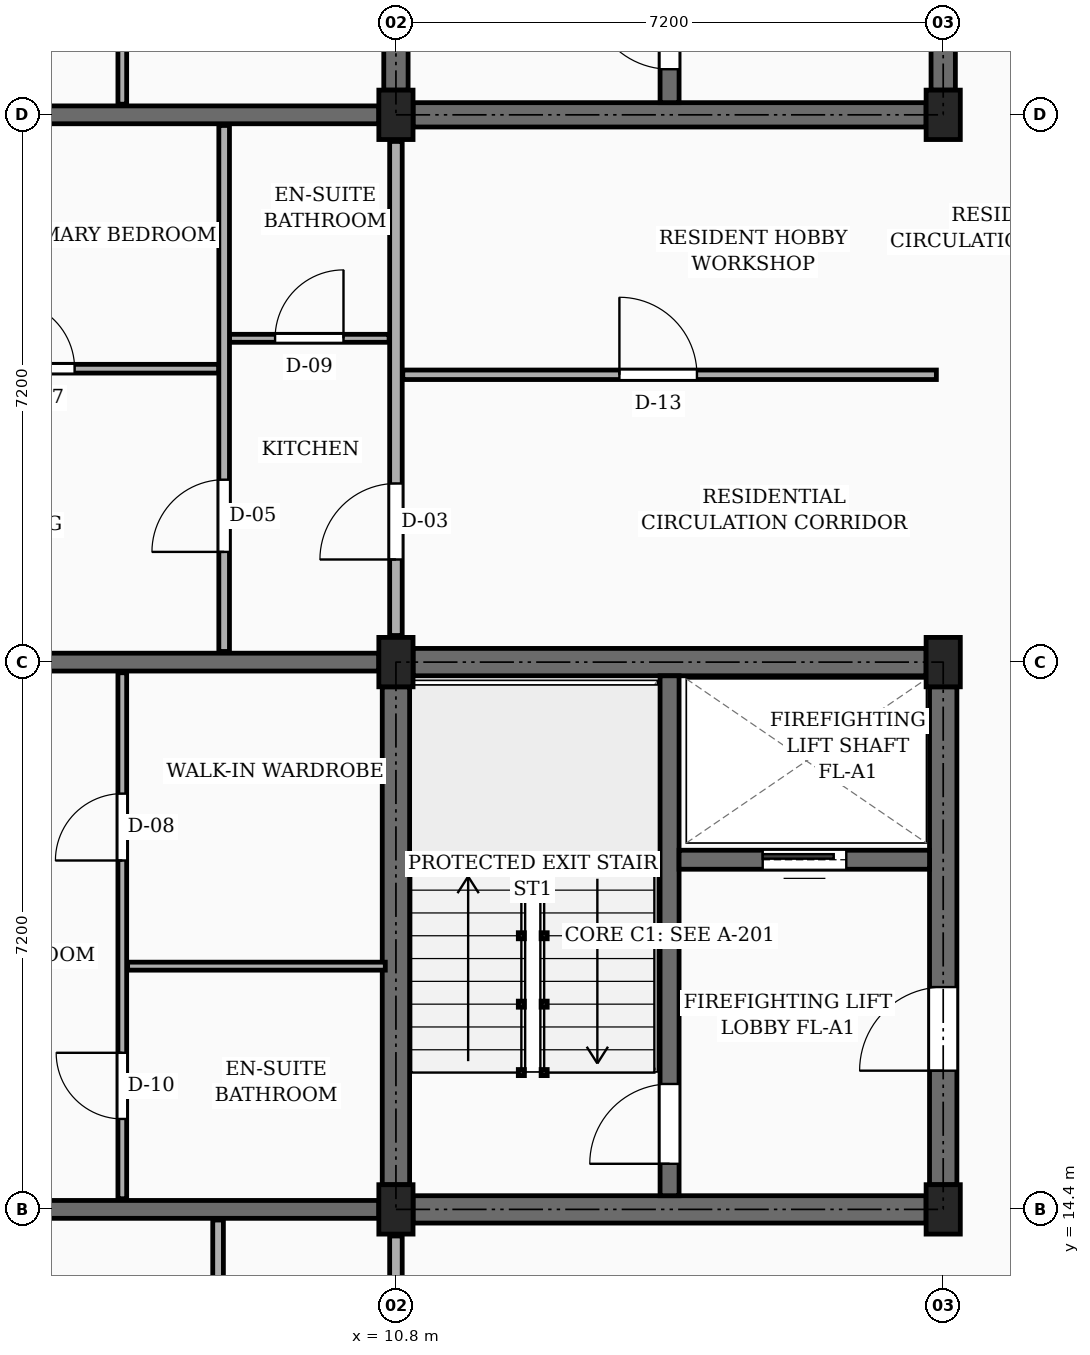
"""IFC4 building model, lengths in metres.
Left out: names, types, materials, properties, quantities, classifications, styles, units other than length and angle.
Written with IfcOpenShell. Run it as: python <this file> out.ifc"""

import sys

from ifc_helpers import new_model, si_unit, direction, frame, frame_2d, origin, origin_2d, place, context, subcontext, project, spatial, rectangle, extrude, element, fill, save


model = new_model("IFC4")
c1 = context("Model", 3, precision=1e-05, world=origin(), true_north=direction((0.0, 1.0)))
c2 = subcontext(c1, "Body", "Model", "MODEL_VIEW")
j1 = project(units=[si_unit("LENGTHUNIT", "METRE"), si_unit("PLANEANGLEUNIT", "RADIAN")], contexts=[c1])
p1 = place(None, origin())
s1 = spatial("IfcSite", under=j1, at=p1, CompositionType="ELEMENT")
p2 = place(p1, origin())
s2 = spatial("IfcBuilding", under=s1, at=p2, CompositionType="ELEMENT")
p3 = place(p2, frame((0.0, 0.0, 13.95)))
s3 = spatial("IfcBuildingStorey", under=s2, at=p3, CompositionType="ELEMENT", Elevation=13.95)
for number, where, z_axis, x_axis in (
    (1, (10.8, 14.4, 0.0), (0.0, 0.0, 1.0), (1.0, 0.0, 0.0)),
    (2, (10.8, 21.6, 0.0), (0.0, 0.0, 1.0), (1.0, 0.0, 0.0)),
    (3, (10.8, 28.8, 0.0), (0.0, 0.0, 1.0), (1.0, 0.0, 0.0)),
    (4, (18.0, 14.4, 0.0), (0.0, 0.0, 1.0), (1.0, 0.0, 0.0)),
    (5, (18.0, 21.6, 0.0), (0.0, 0.0, 1.0), (1.0, 0.0, 0.0)),
    (6, (18.0, 28.8, 0.0), (0.0, 0.0, 1.0), (1.0, 0.0, 0.0)),
):
    element("IfcColumn", number, at=place(p3, frame(where, z_axis=z_axis, x_axis=x_axis)), inside=s3, PredefinedType="COLUMN", context=c2, shape_type="SweptSolid", body=[
        extrude(rectangle(XDim=0.45, YDim=0.65, at=origin_2d()), origin(), (0.0, 0.0, 1.0), 3.15),
    ])
p4 = place(p3, frame((3.875, 14.4, 0.0), z_axis=(0.0, 0.0, 1.0), x_axis=(1.0, 0.0, 0.0)))
e7 = element("IfcWall", 7, at=p4, inside=s3, PredefinedType="SOLIDWALL", context=c2, shape_type="SweptSolid", body=[
    extrude(rectangle(XDim=6.7, YDim=0.235, at=frame_2d((3.35, 0.0))), origin(), (0.0, 0.0, 1.0), 2.17),
])
p5 = place(p4, frame((1.35, 0.0, 0.0)))
e8 = element("IfcOpeningElement", 8, at=p5, cuts=e7, PredefinedType="OPENING", context=c2, shape_type="SweptSolid", body=[
    extrude(rectangle(XDim=0.98, YDim=2.12, at=frame_2d((0.49, 1.06))), frame((0.0, 0.127, 0.0), z_axis=(0.0, -1.0, 0.0), x_axis=(1.0, 0.0, 0.0)), (0.0, 0.0, 1.0), 0.255),
])
p6 = place(p3, frame((3.875, 21.6, 0.0), z_axis=(0.0, 0.0, 1.0), x_axis=(1.0, 0.0, 0.0)))
e9 = element("IfcWall", 9, at=p6, inside=s3, PredefinedType="SOLIDWALL", context=c2, shape_type="SweptSolid", body=[
    extrude(rectangle(XDim=6.7, YDim=0.235, at=frame_2d((3.35, 0.0))), origin(), (0.0, 0.0, 1.0), 2.17),
])
p7 = place(p3, frame((3.875, 28.8, 0.0), z_axis=(0.0, 0.0, 1.0), x_axis=(1.0, 0.0, 0.0)))
e10 = element("IfcWall", 10, at=p7, inside=s3, PredefinedType="SOLIDWALL", context=c2, shape_type="SweptSolid", body=[
    extrude(rectangle(XDim=6.7, YDim=0.235, at=frame_2d((3.35, 0.0))), origin(), (0.0, 0.0, 1.0), 2.17),
])
p8 = place(p7, frame((1.35, 0.0, 0.0)))
e11 = element("IfcOpeningElement", 11, at=p8, cuts=e10, PredefinedType="OPENING", context=c2, shape_type="SweptSolid", body=[
    extrude(rectangle(XDim=0.98, YDim=2.12, at=frame_2d((0.49, 1.06))), frame((0.0, 0.127, 0.0), z_axis=(0.0, -1.0, 0.0), x_axis=(1.0, 0.0, 0.0)), (0.0, 0.0, 1.0), 0.255),
])
p9 = place(p3, frame((10.8, 14.725, 0.0), z_axis=(0.0, 0.0, 1.0), x_axis=(0.0, 1.0, 0.0)))
e12 = element("IfcWall", 12, at=p9, inside=s3, PredefinedType="SHEAR", context=c2, shape_type="SweptSolid", body=[
    extrude(rectangle(XDim=6.55, YDim=0.36, at=frame_2d((3.275, 0.0))), origin(), (0.0, 0.0, 1.0), 2.87),
])
p10 = place(p3, frame((11.025, 21.6, 0.0), z_axis=(0.0, 0.0, 1.0), x_axis=(1.0, 0.0, 0.0)))
e13 = element("IfcWall", 13, at=p10, inside=s3, PredefinedType="SHEAR", context=c2, shape_type="SweptSolid", body=[
    extrude(rectangle(XDim=6.75, YDim=0.36, at=frame_2d((3.375, 0.0))), origin(), (0.0, 0.0, 1.0), 2.87),
])
p11 = place(p3, frame((18.0, 14.725, 0.0), z_axis=(0.0, 0.0, 1.0), x_axis=(0.0, 1.0, 0.0)))
e14 = element("IfcWall", 14, at=p11, inside=s3, PredefinedType="SHEAR", context=c2, shape_type="SweptSolid", body=[
    extrude(rectangle(XDim=6.55, YDim=0.36, at=frame_2d((3.275, 0.0))), origin(), (0.0, 0.0, 1.0), 2.87),
])
p12 = place(p11, frame((1.5, 0.0, 0.0)))
e15 = element("IfcOpeningElement", 15, at=p12, cuts=e14, PredefinedType="OPENING", context=c2, shape_type="SweptSolid", body=[
    extrude(rectangle(XDim=1.1, YDim=2.15, at=frame_2d((0.55, 1.075))), frame((0.0, 0.19, 0.0), z_axis=(0.0, -1.0, 0.0), x_axis=(1.0, 0.0, 0.0)), (0.0, 0.0, 1.0), 0.38),
])
p13 = place(p3, frame((11.025, 14.4, 0.0), z_axis=(0.0, 0.0, 1.0), x_axis=(1.0, 0.0, 0.0)))
e16 = element("IfcWall", 16, at=p13, inside=s3, PredefinedType="SHEAR", context=c2, shape_type="SweptSolid", body=[
    extrude(rectangle(XDim=6.75, YDim=0.36, at=frame_2d((3.375, 0.0))), origin(), (0.0, 0.0, 1.0), 2.87),
])
p14 = place(p3, frame((14.4, 14.58, 0.0), z_axis=(0.0, 0.0, 1.0), x_axis=(0.0, 1.0, 0.0)))
e17 = element("IfcWall", 17, at=p14, inside=s3, PredefinedType="SHEAR", context=c2, shape_type="SweptSolid", body=[
    extrude(rectangle(XDim=6.84, YDim=0.25, at=frame_2d((3.42, 0.0))), origin(), (0.0, 0.0, 1.0), 2.87),
])
p15 = place(p14, frame((0.42, 0.0, 0.0)))
e18 = element("IfcOpeningElement", 18, at=p15, cuts=e17, PredefinedType="OPENING", context=c2, shape_type="SweptSolid", body=[
    extrude(rectangle(XDim=1.05, YDim=2.15, at=frame_2d((0.525, 1.075))), frame((0.0, 0.135, 0.0), z_axis=(0.0, -1.0, 0.0), x_axis=(1.0, 0.0, 0.0)), (0.0, 0.0, 1.0), 0.27),
])
p16 = place(p3, frame((14.525, 19.0, 0.0), z_axis=(0.0, 0.0, 1.0), x_axis=(1.0, 0.0, 0.0)))
e19 = element("IfcWall", 19, at=p16, inside=s3, PredefinedType="SHEAR", context=c2, shape_type="SweptSolid", body=[
    extrude(rectangle(XDim=3.295, YDim=0.25, at=frame_2d((1.647, 0.0))), origin(), (0.0, 0.0, 1.0), 2.87),
])
p17 = place(p16, frame((1.1, 0.0, 0.0)))
e20 = element("IfcOpeningElement", 20, at=p17, cuts=e19, PredefinedType="OPENING", context=c2, shape_type="SweptSolid", body=[
    extrude(rectangle(XDim=1.1, YDim=2.2, at=frame_2d((0.55, 1.1))), frame((0.0, 0.135, 0.0), z_axis=(0.0, -1.0, 0.0), x_axis=(1.0, 0.0, 0.0)), (0.0, 0.0, 1.0), 0.27),
])
p18 = place(p3, frame((10.8, 29.125, 0.0), z_axis=(0.0, 0.0, 1.0), x_axis=(0.0, 1.0, 0.0)))
e21 = element("IfcWall", 21, at=p18, inside=s3, PredefinedType="SHEAR", context=c2, shape_type="SweptSolid", body=[
    extrude(rectangle(XDim=6.55, YDim=0.32, at=frame_2d((3.275, 0.0))), origin(), (0.0, 0.0, 1.0), 2.87),
])
p19 = place(p3, frame((18.0, 29.125, 0.0), z_axis=(0.0, 0.0, 1.0), x_axis=(0.0, 1.0, 0.0)))
e22 = element("IfcWall", 22, at=p19, inside=s3, PredefinedType="SHEAR", context=c2, shape_type="SweptSolid", body=[
    extrude(rectangle(XDim=6.55, YDim=0.32, at=frame_2d((3.275, 0.0))), origin(), (0.0, 0.0, 1.0), 2.87),
])
p20 = place(p19, frame((1.5, 0.0, 0.0)))
e23 = element("IfcOpeningElement", 23, at=p20, cuts=e22, PredefinedType="OPENING", context=c2, shape_type="SweptSolid", body=[
    extrude(rectangle(XDim=1.1, YDim=2.15, at=frame_2d((0.55, 1.075))), frame((0.0, 0.17, 0.0), z_axis=(0.0, -1.0, 0.0), x_axis=(1.0, 0.0, 0.0)), (0.0, 0.0, 1.0), 0.34),
])
p21 = place(p3, frame((11.025, 28.8, 0.0), z_axis=(0.0, 0.0, 1.0), x_axis=(1.0, 0.0, 0.0)))
e24 = element("IfcWall", 24, at=p21, inside=s3, PredefinedType="SHEAR", context=c2, shape_type="SweptSolid", body=[
    extrude(rectangle(XDim=6.75, YDim=0.32, at=frame_2d((3.375, 0.0))), origin(), (0.0, 0.0, 1.0), 2.87),
])
p22 = place(p3, frame((14.4, 28.96, 0.0), z_axis=(0.0, 0.0, 1.0), x_axis=(0.0, 1.0, 0.0)))
e25 = element("IfcWall", 25, at=p22, inside=s3, PredefinedType="SHEAR", context=c2, shape_type="SweptSolid", body=[
    extrude(rectangle(XDim=6.88, YDim=0.25, at=frame_2d((3.44, 0.0))), origin(), (0.0, 0.0, 1.0), 2.87),
])
p23 = place(p22, frame((0.44, 0.0, 0.0)))
e26 = element("IfcOpeningElement", 26, at=p23, cuts=e25, PredefinedType="OPENING", context=c2, shape_type="SweptSolid", body=[
    extrude(rectangle(XDim=1.05, YDim=2.15, at=frame_2d((0.525, 1.075))), frame((0.0, 0.135, 0.0), z_axis=(0.0, -1.0, 0.0), x_axis=(1.0, 0.0, 0.0)), (0.0, 0.0, 1.0), 0.27),
])
p24 = place(p3, frame((10.8, 7.55, 0.0), z_axis=(0.0, 0.0, 1.0), x_axis=(0.0, 1.0, 0.0)))
e27 = element("IfcWall", 27, at=p24, inside=s3, PredefinedType="PARTITIONING", context=c2, shape_type="SweptSolid", body=[
    extrude(rectangle(XDim=6.5, YDim=0.165, at=frame_2d((3.25, 0.0))), origin(), (0.0, 0.0, 1.0), 2.305),
])
p25 = place(p24, frame((1.0, 0.0, 0.0)))
e28 = element("IfcOpeningElement", 28, at=p25, cuts=e27, PredefinedType="OPENING", context=c2, shape_type="SweptSolid", body=[
    extrude(rectangle(XDim=1.14, YDim=2.18, at=frame_2d((0.57, 1.09))), frame((0.0, 0.093, 0.0), z_axis=(0.0, -1.0, 0.0), x_axis=(1.0, 0.0, 0.0)), (0.0, 0.0, 1.0), 0.185),
])
p26 = place(p3, frame((10.8, 21.95, 0.0), z_axis=(0.0, 0.0, 1.0), x_axis=(0.0, 1.0, 0.0)))
e29 = element("IfcWall", 29, at=p26, inside=s3, PredefinedType="PARTITIONING", context=c2, shape_type="SweptSolid", body=[
    extrude(rectangle(XDim=6.5, YDim=0.165, at=frame_2d((3.25, 0.0))), origin(), (0.0, 0.0, 1.0), 2.305),
])
p27 = place(p26, frame((1.0, 0.0, 0.0)))
e30 = element("IfcOpeningElement", 30, at=p27, cuts=e29, PredefinedType="OPENING", context=c2, shape_type="SweptSolid", body=[
    extrude(rectangle(XDim=1.0, YDim=2.15, at=frame_2d((0.5, 1.075))), frame((0.0, 0.093, 0.0), z_axis=(0.0, -1.0, 0.0), x_axis=(1.0, 0.0, 0.0)), (0.0, 0.0, 1.0), 0.185),
])
p28 = place(p3, frame((8.46, 7.375, 0.0), z_axis=(0.0, 0.0, 1.0), x_axis=(0.0, 1.0, 0.0)))
e31 = element("IfcWall", 31, at=p28, inside=s3, PredefinedType="PARTITIONING", context=c2, shape_type="SweptSolid", body=[
    extrude(rectangle(XDim=6.885, YDim=0.14, at=frame_2d((3.442, 0.0))), origin(), (0.0, 0.0, 1.0), 2.305),
])
p29 = place(p28, frame((1.275, 0.0, 0.0)))
e32 = element("IfcOpeningElement", 32, at=p29, cuts=e31, PredefinedType="OPENING", context=c2, shape_type="SweptSolid", body=[
    extrude(rectangle(XDim=0.92, YDim=2.1, at=frame_2d((0.46, 1.05))), frame((0.0, 0.08, 0.0), z_axis=(0.0, -1.0, 0.0), x_axis=(1.0, 0.0, 0.0)), (0.0, 0.0, 1.0), 0.16),
])
p30 = place(p3, frame((7.2, 14.54, 0.0), z_axis=(0.0, 0.0, 1.0), x_axis=(0.0, 1.0, 0.0)))
e33 = element("IfcWall", 33, at=p30, inside=s3, PredefinedType="PARTITIONING", context=c2, shape_type="SweptSolid", body=[
    extrude(rectangle(XDim=6.92, YDim=0.115, at=frame_2d((3.46, 0.0))), origin(), (0.0, 0.0, 1.0), 2.305),
])
p31 = place(p30, frame((1.05, 0.0, 0.0)))
e34 = element("IfcOpeningElement", 34, at=p31, cuts=e33, PredefinedType="OPENING", context=c2, shape_type="SweptSolid", body=[
    extrude(rectangle(XDim=0.87, YDim=2.05, at=frame_2d((0.435, 1.025))), frame((0.0, 0.067, 0.0), z_axis=(0.0, -1.0, 0.0), x_axis=(1.0, 0.0, 0.0)), (0.0, 0.0, 1.0), 0.135),
])
p32 = place(p30, frame((4.45, 0.0, 0.0)))
e35 = element("IfcOpeningElement", 35, at=p32, cuts=e33, PredefinedType="OPENING", context=c2, shape_type="SweptSolid", body=[
    extrude(rectangle(XDim=0.88, YDim=2.08, at=frame_2d((0.44, 1.04))), frame((0.0, 0.067, 0.0), z_axis=(0.0, -1.0, 0.0), x_axis=(1.0, 0.0, 0.0)), (0.0, 0.0, 1.0), 0.135),
])
p33 = place(p3, frame((7.27, 17.6, 0.0), z_axis=(0.0, 0.0, 1.0), x_axis=(1.0, 0.0, 0.0)))
e36 = element("IfcWall", 36, at=p33, inside=s3, PredefinedType="PARTITIONING", context=c2, shape_type="SweptSolid", body=[
    extrude(rectangle(XDim=3.39, YDim=0.105, at=frame_2d((1.695, 0.0))), origin(), (0.0, 0.0, 1.0), 2.305),
])
p34 = place(p3, frame((10.89, 25.38, 0.0), z_axis=(0.0, 0.0, 1.0), x_axis=(1.0, 0.0, 0.0)))
e37 = element("IfcWall", 37, at=p34, inside=s3, PredefinedType="PARTITIONING", context=c2, shape_type="SweptSolid", body=[
    extrude(rectangle(XDim=7.02, YDim=0.125, at=frame_2d((3.51, 0.0))), origin(), (0.0, 0.0, 1.0), 2.305),
])
p35 = place(p34, frame((2.85, 0.0, 0.0)))
e38 = element("IfcOpeningElement", 38, at=p35, cuts=e37, PredefinedType="OPENING", context=c2, shape_type="SweptSolid", body=[
    extrude(rectangle(XDim=1.02, YDim=2.15, at=frame_2d((0.51, 1.075))), frame((0.0, 0.073, 0.0), z_axis=(0.0, -1.0, 0.0), x_axis=(1.0, 0.0, 0.0)), (0.0, 0.0, 1.0), 0.145),
])
p36 = place(p3, frame((3.775, 25.46, 0.0), z_axis=(0.0, 0.0, 1.0), x_axis=(1.0, 0.0, 0.0)))
e39 = element("IfcWall", 39, at=p36, inside=s3, PredefinedType="PARTITIONING", context=c2, shape_type="SweptSolid", body=[
    extrude(rectangle(XDim=4.695, YDim=0.115, at=frame_2d((2.348, 0.0))), origin(), (0.0, 0.0, 1.0), 2.305),
])
p37 = place(p36, frame((1.897, 0.0, 0.0)))
e40 = element("IfcOpeningElement", 40, at=p37, cuts=e39, PredefinedType="OPENING", context=c2, shape_type="SweptSolid", body=[
    extrude(rectangle(XDim=0.9, YDim=2.1, at=frame_2d((0.45, 1.05))), frame((0.0, 0.067, 0.0), z_axis=(0.0, -1.0, 0.0), x_axis=(1.0, 0.0, 0.0)), (0.0, 0.0, 1.0), 0.135),
])
p38 = place(p3, frame((8.61, 25.86, 0.0), z_axis=(0.0, 0.0, 1.0), x_axis=(1.0, 0.0, 0.0)))
e41 = element("IfcWall", 41, at=p38, inside=s3, PredefinedType="PARTITIONING", context=c2, shape_type="SweptSolid", body=[
    extrude(rectangle(XDim=2.1, YDim=0.105, at=frame_2d((1.05, 0.0))), origin(), (0.0, 0.0, 1.0), 2.305),
])
p39 = place(p38, frame((0.6, 0.0, 0.0)))
e42 = element("IfcOpeningElement", 42, at=p39, cuts=e41, PredefinedType="OPENING", context=c2, shape_type="SweptSolid", body=[
    extrude(rectangle(XDim=0.9, YDim=2.05, at=frame_2d((0.45, 1.025))), frame((0.0, 0.062, 0.0), z_axis=(0.0, -1.0, 0.0), x_axis=(1.0, 0.0, 0.0)), (0.0, 0.0, 1.0), 0.125),
])
p40 = place(p3, frame((8.54, 21.74, 0.0), z_axis=(0.0, 0.0, 1.0), x_axis=(0.0, 1.0, 0.0)))
e43 = element("IfcWall", 43, at=p40, inside=s3, PredefinedType="PARTITIONING", context=c2, shape_type="SweptSolid", body=[
    extrude(rectangle(XDim=6.92, YDim=0.14, at=frame_2d((3.46, 0.0))), origin(), (0.0, 0.0, 1.0), 2.305),
])
p41 = place(p40, frame((1.31, 0.0, 0.0)))
e44 = element("IfcOpeningElement", 44, at=p41, cuts=e43, PredefinedType="OPENING", context=c2, shape_type="SweptSolid", body=[
    extrude(rectangle(XDim=0.95, YDim=2.1, at=frame_2d((0.475, 1.05))), frame((0.0, 0.08, 0.0), z_axis=(0.0, -1.0, 0.0), x_axis=(1.0, 0.0, 0.0)), (0.0, 0.0, 1.0), 0.16),
])
p42 = place(p3, frame((7.2, 28.94, 0.0), z_axis=(0.0, 0.0, 1.0), x_axis=(0.0, 1.0, 0.0)))
e45 = element("IfcWall", 45, at=p42, inside=s3, PredefinedType="PARTITIONING", context=c2, shape_type="SweptSolid", body=[
    extrude(rectangle(XDim=6.92, YDim=0.115, at=frame_2d((3.46, 0.0))), origin(), (0.0, 0.0, 1.0), 2.305),
])
p43 = place(p42, frame((1.05, 0.0, 0.0)))
e46 = element("IfcOpeningElement", 46, at=p43, cuts=e45, PredefinedType="OPENING", context=c2, shape_type="SweptSolid", body=[
    extrude(rectangle(XDim=0.87, YDim=2.05, at=frame_2d((0.435, 1.025))), frame((0.0, 0.067, 0.0), z_axis=(0.0, -1.0, 0.0), x_axis=(1.0, 0.0, 0.0)), (0.0, 0.0, 1.0), 0.135),
])
p44 = place(p42, frame((4.45, 0.0, 0.0)))
e47 = element("IfcOpeningElement", 47, at=p44, cuts=e45, PredefinedType="OPENING", context=c2, shape_type="SweptSolid", body=[
    extrude(rectangle(XDim=0.88, YDim=2.08, at=frame_2d((0.44, 1.04))), frame((0.0, 0.067, 0.0), z_axis=(0.0, -1.0, 0.0), x_axis=(1.0, 0.0, 0.0)), (0.0, 0.0, 1.0), 0.135),
])
p45 = place(p12, frame((1.1, 0.0, 0.0), z_axis=(0.0, 0.0, 1.0), x_axis=(-1.0, 0.0, 0.0)))
e48 = element("IfcDoor", 48, at=p45, inside=s3, OperationType="SINGLE_SWING_LEFT", PredefinedType="DOOR", context=c2, shape_type="SweptSolid", body=[
    extrude(rectangle(XDim=1.1, YDim=2.15, at=frame_2d((0.55, 1.075))), frame((0.0, 0.025, 0.0), z_axis=(0.0, -1.0, 0.0), x_axis=(1.0, 0.0, 0.0)), (0.0, 0.0, 1.0), 0.05),
])
fill(e15, e48)
p46 = place(p15, origin())
e49 = element("IfcDoor", 49, at=p46, inside=s3, OperationType="SINGLE_SWING_LEFT", PredefinedType="DOOR", context=c2, shape_type="SweptSolid", body=[
    extrude(rectangle(XDim=1.05, YDim=2.15, at=frame_2d((0.525, 1.075))), frame((0.0, 0.025, 0.0), z_axis=(0.0, -1.0, 0.0), x_axis=(1.0, 0.0, 0.0)), (0.0, 0.0, 1.0), 0.05),
])
fill(e18, e49)
p47 = place(p17, origin())
e50 = element("IfcDoor", 50, at=p47, inside=s3, OperationType="SLIDING_TO_LEFT", PredefinedType="DOOR", context=c2, shape_type="SweptSolid", body=[
    extrude(rectangle(XDim=1.1, YDim=2.2, at=frame_2d((0.55, 1.1))), frame((0.0, 0.025, 0.0), z_axis=(0.0, -1.0, 0.0), x_axis=(1.0, 0.0, 0.0)), (0.0, 0.0, 1.0), 0.05),
])
fill(e20, e50)
p48 = place(p23, origin())
e51 = element("IfcDoor", 51, at=p48, inside=s3, OperationType="SINGLE_SWING_RIGHT", PredefinedType="DOOR", context=c2, shape_type="SweptSolid", body=[
    extrude(rectangle(XDim=1.05, YDim=2.15, at=frame_2d((0.525, 1.075))), frame((0.0, 0.025, 0.0), z_axis=(0.0, -1.0, 0.0), x_axis=(1.0, 0.0, 0.0)), (0.0, 0.0, 1.0), 0.05),
])
fill(e26, e51)
p49 = place(p27, origin())
e52 = element("IfcDoor", 52, at=p49, inside=s3, OperationType="SINGLE_SWING_LEFT", PredefinedType="DOOR", context=c2, shape_type="SweptSolid", body=[
    extrude(rectangle(XDim=1.0, YDim=2.15, at=frame_2d((0.5, 1.075))), frame((0.0, 0.025, 0.0), z_axis=(0.0, -1.0, 0.0), x_axis=(1.0, 0.0, 0.0)), (0.0, 0.0, 1.0), 0.05),
])
fill(e30, e52)
p50 = place(p31, origin())
e53 = element("IfcDoor", 53, at=p50, inside=s3, OperationType="SINGLE_SWING_RIGHT", PredefinedType="DOOR", context=c2, shape_type="SweptSolid", body=[
    extrude(rectangle(XDim=0.87, YDim=2.05, at=frame_2d((0.435, 1.025))), frame((0.0, 0.025, 0.0), z_axis=(0.0, -1.0, 0.0), x_axis=(1.0, 0.0, 0.0)), (0.0, 0.0, 1.0), 0.05),
])
fill(e34, e53)
p51 = place(p32, origin())
e54 = element("IfcDoor", 54, at=p51, inside=s3, OperationType="SINGLE_SWING_LEFT", PredefinedType="DOOR", context=c2, shape_type="SweptSolid", body=[
    extrude(rectangle(XDim=0.88, YDim=2.08, at=frame_2d((0.44, 1.04))), frame((0.0, 0.025, 0.0), z_axis=(0.0, -1.0, 0.0), x_axis=(1.0, 0.0, 0.0)), (0.0, 0.0, 1.0), 0.05),
])
fill(e35, e54)
p52 = place(p35, origin())
e55 = element("IfcDoor", 55, at=p52, inside=s3, OperationType="SINGLE_SWING_LEFT", PredefinedType="DOOR", context=c2, shape_type="SweptSolid", body=[
    extrude(rectangle(XDim=1.02, YDim=2.15, at=frame_2d((0.51, 1.075))), frame((0.0, 0.025, 0.0), z_axis=(0.0, -1.0, 0.0), x_axis=(1.0, 0.0, 0.0)), (0.0, 0.0, 1.0), 0.05),
])
fill(e38, e55)
p53 = place(p37, origin())
e56 = element("IfcDoor", 56, at=p53, inside=s3, OperationType="SINGLE_SWING_LEFT", PredefinedType="DOOR", context=c2, shape_type="SweptSolid", body=[
    extrude(rectangle(XDim=0.9, YDim=2.1, at=frame_2d((0.45, 1.05))), frame((0.0, 0.025, 0.0), z_axis=(0.0, -1.0, 0.0), x_axis=(1.0, 0.0, 0.0)), (0.0, 0.0, 1.0), 0.05),
])
fill(e40, e56)
p54 = place(p39, origin())
e57 = element("IfcDoor", 57, at=p54, inside=s3, OperationType="SINGLE_SWING_RIGHT", PredefinedType="DOOR", context=c2, shape_type="SweptSolid", body=[
    extrude(rectangle(XDim=0.9, YDim=2.05, at=frame_2d((0.45, 1.025))), frame((0.0, 0.025, 0.0), z_axis=(0.0, -1.0, 0.0), x_axis=(1.0, 0.0, 0.0)), (0.0, 0.0, 1.0), 0.05),
])
fill(e42, e57)
p55 = place(p41, origin())
e58 = element("IfcDoor", 58, at=p55, inside=s3, OperationType="SINGLE_SWING_LEFT", PredefinedType="DOOR", context=c2, shape_type="SweptSolid", body=[
    extrude(rectangle(XDim=0.95, YDim=2.1, at=frame_2d((0.475, 1.05))), frame((0.0, 0.025, 0.0), z_axis=(0.0, -1.0, 0.0), x_axis=(1.0, 0.0, 0.0)), (0.0, 0.0, 1.0), 0.05),
])
fill(e44, e58)
save(model, sys.argv[1])
